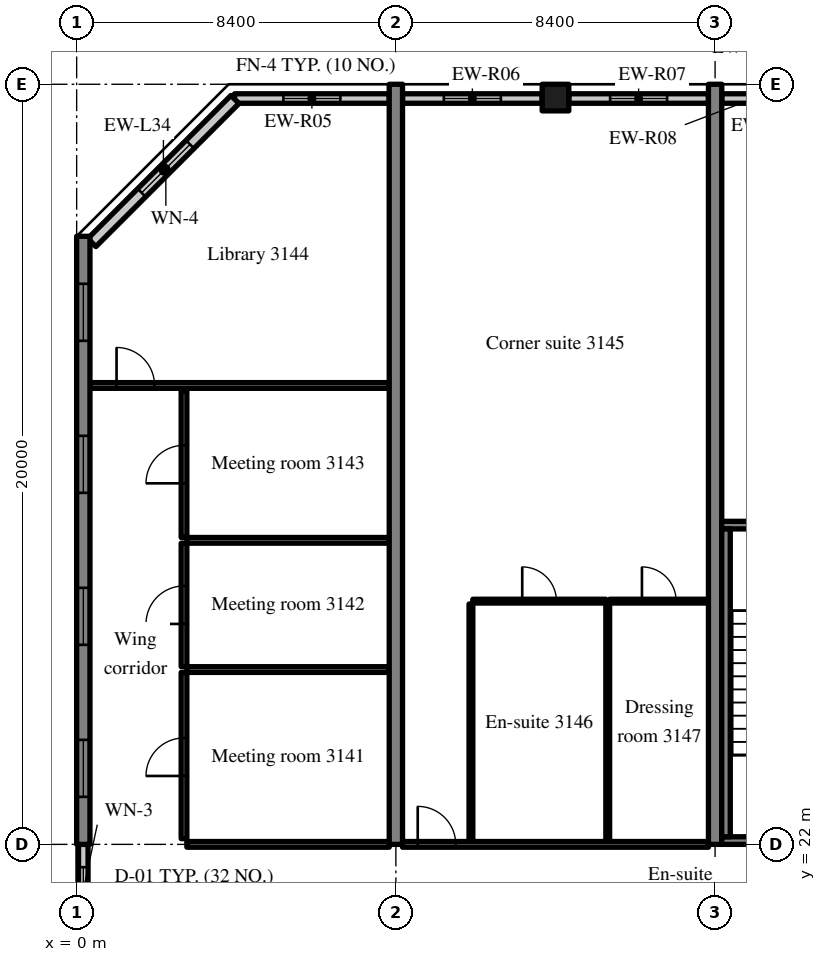
"""IFC4 building model, lengths in metres.
Left out: names, types, materials, properties, quantities, classifications, styles, units other than length and angle.
Written with IfcOpenShell. Run it as: python <this file> out.ifc"""

import sys

from ifc_helpers import new_model, si_unit, direction, frame, frame_2d, origin, origin_2d, place, context, subcontext, project, spatial, rectangle, extrude, source, transform, mapped, element, fill, save


model = new_model("IFC4")
c1 = context("Model", 3, precision=1e-05, world=origin(), true_north=direction((0.0, 1.0)))
c2 = subcontext(c1, "Body", "Model", "MODEL_VIEW")
j1 = project(units=[si_unit("LENGTHUNIT", "METRE"), si_unit("PLANEANGLEUNIT", "RADIAN")], contexts=[c1])
p1 = place(None, origin())
s1 = spatial("IfcSite", under=j1, at=p1, CompositionType="ELEMENT")
p2 = place(p1, origin())
s2 = spatial("IfcBuilding", under=s1, at=p2, CompositionType="ELEMENT")
p3 = place(p2, frame((0.0, 0.0, 129.4)))
s3 = spatial("IfcBuildingStorey", under=s2, at=p3, CompositionType="ELEMENT", Elevation=129.4)
m1 = source(origin(), c2, "Body", "SweptSolid", [
    extrude(rectangle(XDim=16.0, YDim=0.35, at=frame_2d((8.0, 0.0))), origin(), (0.0, 0.0, 1.0), 3.52),
])
p4 = place(p3, frame((0.175, 22.0, 0.0), z_axis=(0.0, 0.0, 1.0), x_axis=(0.0, 1.0, 0.0)))
e1 = element("IfcWall", 1, at=p4, inside=s3, PredefinedType="SHEAR", context=c2, shape_type="MappedRepresentation", body=[
    mapped(m1, transform((0.0, 0.0, 0.0), scale=1.0)),
])
m2 = source(origin(), c2, "Body", "SweptSolid", [
    extrude(rectangle(XDim=1.5, YDim=1.5, at=frame_2d((0.75, 0.75))), frame((0.0, 0.185, 0.0), z_axis=(0.0, -1.0, 0.0), x_axis=(1.0, 0.0, 0.0)), (0.0, 0.0, 1.0), 0.37),
])
p5 = place(p4, frame((1.25, 0.0, 0.9)))
e2 = element("IfcOpeningElement", 2, at=p5, cuts=e1, PredefinedType="OPENING", context=c2, shape_type="MappedRepresentation", body=[
    mapped(m2, transform((0.0, 0.0, 0.0), scale=1.0)),
])
p6 = place(p4, frame((5.25, 0.0, 0.9)))
e3 = element("IfcOpeningElement", 3, at=p6, cuts=e1, PredefinedType="OPENING", context=c2, shape_type="MappedRepresentation", body=[
    mapped(m2, transform((0.0, 0.0, 0.0), scale=1.0)),
])
p7 = place(p4, frame((9.25, 0.0, 0.9)))
e4 = element("IfcOpeningElement", 4, at=p7, cuts=e1, PredefinedType="OPENING", context=c2, shape_type="MappedRepresentation", body=[
    mapped(m2, transform((0.0, 0.0, 0.0), scale=1.0)),
])
p8 = place(p4, frame((13.25, 0.0, 0.9)))
e5 = element("IfcOpeningElement", 5, at=p8, cuts=e1, PredefinedType="OPENING", context=c2, shape_type="MappedRepresentation", body=[
    mapped(m2, transform((0.0, 0.0, 0.0), scale=1.0)),
])
m3 = source(origin(), c2, "Body", "SweptSolid", [
    extrude(rectangle(XDim=20.0, YDim=0.35, at=frame_2d((10.0, 0.0))), origin(), (0.0, 0.0, 1.0), 3.52),
])
for number, where, z_axis, x_axis in (
    (6, (8.4, 22.0, 0.0), (0.0, 0.0, 1.0), (0.0, 1.0, 0.0)),
    (7, (16.8, 22.0, 0.0), (0.0, 0.0, 1.0), (0.0, 1.0, 0.0)),
):
    element("IfcWall", number, at=place(p3, frame(where, z_axis=z_axis, x_axis=x_axis)), inside=s3, PredefinedType="SHEAR", context=c2, shape_type="MappedRepresentation", body=[
        mapped(m3, transform((0.0, 0.0, 0.0), scale=1.0)),
    ])
m4 = source(origin(), c2, "Body", "SweptSolid", [
    extrude(rectangle(XDim=0.7, YDim=0.7, at=origin_2d()), origin(), (0.0, 0.0, 1.0), 3.52),
])
p9 = place(p3, frame((12.6, 41.65, 0.0), z_axis=(0.0, 0.0, 1.0), x_axis=(1.0, 0.0, 0.0)))
e8 = element("IfcColumn", 8, at=p9, inside=s3, PredefinedType="COLUMN", context=c2, shape_type="MappedRepresentation", body=[
    mapped(m4, transform((0.0, 0.0, 0.0), scale=1.0)),
])
m5 = source(origin(), c2, "Body", "SweptSolid", [
    extrude(rectangle(XDim=4.07, YDim=0.25, at=frame_2d((2.035, 0.0))), origin(), (0.0, 0.0, 1.0), 2.82),
])
p10 = place(p3, frame((8.225, 41.625, 0.0), z_axis=(0.0, 0.0, 1.0), x_axis=(-1.0, 0.0, 0.0)))
e9 = element("IfcWall", 9, at=p10, inside=s3, PredefinedType="SOLIDWALL", context=c2, shape_type="MappedRepresentation", body=[
    mapped(m5, transform((0.0, 0.0, 0.0), scale=1.0)),
])
m6 = source(origin(), c2, "Body", "SweptSolid", [
    extrude(rectangle(XDim=1.5, YDim=1.5, at=frame_2d((0.75, 0.75))), frame((0.0, 0.135, 0.0), z_axis=(0.0, -1.0, 0.0), x_axis=(1.0, 0.0, 0.0)), (0.0, 0.0, 1.0), 0.27),
])
p11 = place(p10, frame((1.285, 0.0, 0.9)))
e10 = element("IfcOpeningElement", 10, at=p11, cuts=e9, PredefinedType="OPENING", context=c2, shape_type="MappedRepresentation", body=[
    mapped(m6, transform((0.0, 0.0, 0.0), scale=1.0)),
])
m7 = source(origin(), c2, "Body", "SweptSolid", [
    extrude(rectangle(XDim=3.675, YDim=0.25, at=frame_2d((1.837, 0.0))), origin(), (0.0, 0.0, 1.0), 2.82),
])
p12 = place(p3, frame((12.25, 41.625, 0.0), z_axis=(0.0, 0.0, 1.0), x_axis=(-1.0, 0.0, 0.0)))
e11 = element("IfcWall", 11, at=p12, inside=s3, PredefinedType="SOLIDWALL", context=c2, shape_type="MappedRepresentation", body=[
    mapped(m7, transform((0.0, 0.0, 0.0), scale=1.0)),
])
p13 = place(p12, frame((1.087, 0.0, 0.9)))
e12 = element("IfcOpeningElement", 12, at=p13, cuts=e11, PredefinedType="OPENING", context=c2, shape_type="MappedRepresentation", body=[
    mapped(m6, transform((0.0, 0.0, 0.0), scale=1.0)),
])
p14 = place(p3, frame((16.625, 41.625, 0.0), z_axis=(0.0, 0.0, 1.0), x_axis=(-1.0, 0.0, 0.0)))
e13 = element("IfcWall", 13, at=p14, inside=s3, PredefinedType="SOLIDWALL", context=c2, shape_type="MappedRepresentation", body=[
    mapped(m7, transform((0.0, 0.0, 0.0), scale=1.0)),
])
p15 = place(p14, frame((1.087, 0.0, 0.9)))
e14 = element("IfcOpeningElement", 14, at=p15, cuts=e13, PredefinedType="OPENING", context=c2, shape_type="MappedRepresentation", body=[
    mapped(m6, transform((0.0, 0.0, 0.0), scale=1.0)),
])
m8 = source(origin(), c2, "Body", "SweptSolid", [
    extrude(rectangle(XDim=1.683, YDim=0.25, at=frame_2d((0.841, 0.0))), origin(), (0.0, 0.0, 1.0), 2.82),
])
p16 = place(p3, frame((18.658, 41.625, 0.0), z_axis=(0.0, 0.0, 1.0), x_axis=(-1.0, 0.0, 0.0)))
e15 = element("IfcWall", 15, at=p16, inside=s3, PredefinedType="SOLIDWALL", context=c2, shape_type="MappedRepresentation", body=[
    mapped(m8, transform((0.0, 0.0, 0.0), scale=1.0)),
])
m9 = source(origin(), c2, "Body", "SweptSolid", [
    extrude(rectangle(XDim=5.326, YDim=0.3, at=frame_2d((2.663, 0.0))), origin(), (0.0, 0.0, 1.0), 3.52),
])
p17 = place(p3, frame((4.166, 41.6, 0.0), z_axis=(0.0, 0.0, 1.0), x_axis=(-0.707106781187, -0.707106781187, 0.0)))
e16 = element("IfcWall", 16, at=p17, inside=s3, PredefinedType="SOLIDWALL", context=c2, shape_type="MappedRepresentation", body=[
    mapped(m9, transform((0.0, 0.0, 0.0), scale=1.0)),
])
m10 = source(origin(), c2, "Body", "SweptSolid", [
    extrude(rectangle(XDim=1.8, YDim=1.5, at=frame_2d((0.9, 0.75))), frame((0.0, 0.16, 0.0), z_axis=(0.0, -1.0, 0.0), x_axis=(1.0, 0.0, 0.0)), (0.0, 0.0, 1.0), 0.32),
])
p18 = place(p17, frame((1.672, 0.0, 0.9)))
e17 = element("IfcOpeningElement", 17, at=p18, cuts=e16, PredefinedType="OPENING", context=c2, shape_type="MappedRepresentation", body=[
    mapped(m10, transform((0.0, 0.0, 0.0), scale=1.0)),
])
m11 = source(origin(), c2, "Body", "SweptSolid", [
    extrude(rectangle(XDim=2.4, YDim=0.25, at=frame_2d((1.2, 0.0))), origin(), (0.0, 0.0, 1.0), 2.62),
])
p19 = place(p3, frame((0.175, 19.6, 0.0), z_axis=(0.0, 0.0, 1.0), x_axis=(0.0, 1.0, 0.0)))
e18 = element("IfcWall", 18, at=p19, inside=s3, PredefinedType="SOLIDWALL", context=c2, shape_type="MappedRepresentation", body=[
    mapped(m11, transform((0.0, 0.0, 0.0), scale=1.0)),
])
m12 = source(origin(), c2, "Body", "SweptSolid", [
    extrude(rectangle(XDim=1.2, YDim=1.5, at=frame_2d((0.6, 0.75))), frame((0.0, 0.135, 0.0), z_axis=(0.0, -1.0, 0.0), x_axis=(1.0, 0.0, 0.0)), (0.0, 0.0, 1.0), 0.27),
])
p20 = place(p19, frame((0.6, 0.0, 0.9)))
e19 = element("IfcOpeningElement", 19, at=p20, cuts=e18, PredefinedType="OPENING", context=c2, shape_type="MappedRepresentation", body=[
    mapped(m12, transform((0.0, 0.0, 0.0), scale=1.0)),
])
m13 = source(origin(), c2, "Body", "SweptSolid", [
    extrude(rectangle(XDim=8.225, YDim=0.2, at=frame_2d((4.112, 0.0))), origin(), (0.0, 0.0, 1.0), 3.52),
])
p21 = place(p3, frame((16.975, 22.1, 0.0), z_axis=(0.0, 0.0, 1.0), x_axis=(1.0, 0.0, 0.0)))
e20 = element("IfcWall", 20, at=p21, inside=s3, PredefinedType="SOLIDWALL", context=c2, shape_type="MappedRepresentation", body=[
    mapped(m13, transform((0.0, 0.0, 0.0), scale=1.0)),
])
m14 = source(origin(), c2, "Body", "SweptSolid", [
    extrude(rectangle(XDim=1.2, YDim=2.1, at=frame_2d((0.6, 1.05))), frame((0.0, 0.11, 0.0), z_axis=(0.0, -1.0, 0.0), x_axis=(1.0, 0.0, 0.0)), (0.0, 0.0, 1.0), 0.22),
])
p22 = place(p21, frame((6.025, 0.0, 0.0)))
e21 = element("IfcOpeningElement", 21, at=p22, cuts=e20, PredefinedType="OPENING", context=c2, shape_type="MappedRepresentation", body=[
    mapped(m14, transform((0.0, 0.0, 0.0), scale=1.0)),
])
p23 = place(p3, frame((16.975, 30.4, 0.0), z_axis=(0.0, 0.0, 1.0), x_axis=(1.0, 0.0, 0.0)))
e22 = element("IfcWall", 22, at=p23, inside=s3, PredefinedType="SOLIDWALL", context=c2, shape_type="MappedRepresentation", body=[
    mapped(m13, transform((0.0, 0.0, 0.0), scale=1.0)),
])
m15 = source(origin(), c2, "Body", "SweptSolid", [
    extrude(rectangle(XDim=1.0, YDim=2.1, at=frame_2d((0.5, 1.05))), frame((0.0, 0.11, 0.0), z_axis=(0.0, -1.0, 0.0), x_axis=(1.0, 0.0, 0.0)), (0.0, 0.0, 1.0), 0.22),
])
p24 = place(p23, frame((6.125, 0.0, 0.0)))
e23 = element("IfcOpeningElement", 23, at=p24, cuts=e22, PredefinedType="OPENING", context=c2, shape_type="MappedRepresentation", body=[
    mapped(m15, transform((0.0, 0.0, 0.0), scale=1.0)),
])
m16 = source(origin(), c2, "Body", "SweptSolid", [
    extrude(rectangle(XDim=8.1, YDim=0.225, at=frame_2d((4.05, 0.0))), origin(), (0.0, 0.0, 1.0), 3.52),
])
p25 = place(p3, frame((17.087, 22.2, 0.0), z_axis=(0.0, 0.0, 1.0), x_axis=(0.0, 1.0, 0.0)))
e24 = element("IfcWall", 24, at=p25, inside=s3, PredefinedType="SOLIDWALL", context=c2, shape_type="MappedRepresentation", body=[
    mapped(m16, transform((0.0, 0.0, 0.0), scale=1.0)),
])
m17 = source(origin(), c2, "Body", "SweptSolid", [
    extrude(rectangle(XDim=5.325, YDim=0.15, at=frame_2d((2.663, 0.0))), origin(), (0.0, 0.0, 1.0), 2.82),
])
p26 = place(p3, frame((2.9, 22.0, 0.0), z_axis=(0.0, 0.0, 1.0), x_axis=(1.0, 0.0, 0.0)))
e25 = element("IfcWall", 25, at=p26, inside=s3, PredefinedType="PARTITIONING", context=c2, shape_type="MappedRepresentation", body=[
    mapped(m17, transform((0.0, 0.0, 0.0), scale=1.0)),
])
m18 = source(origin(), c2, "Body", "SweptSolid", [
    extrude(rectangle(XDim=4.375, YDim=0.15, at=frame_2d((2.188, 0.0))), origin(), (0.0, 0.0, 1.0), 3.52),
])
p27 = place(p3, frame((2.825, 22.15, 0.0), z_axis=(0.0, 0.0, 1.0), x_axis=(0.0, 1.0, 0.0)))
e26 = element("IfcWall", 26, at=p27, inside=s3, PredefinedType="PARTITIONING", context=c2, shape_type="MappedRepresentation", body=[
    mapped(m18, transform((0.0, 0.0, 0.0), scale=1.0)),
])
m19 = source(origin(), c2, "Body", "SweptSolid", [
    extrude(rectangle(XDim=1.0, YDim=2.1, at=frame_2d((0.5, 1.05))), frame((0.0, 0.085, 0.0), z_axis=(0.0, -1.0, 0.0), x_axis=(1.0, 0.0, 0.0)), (0.0, 0.0, 1.0), 0.17),
])
p28 = place(p27, frame((1.65, 0.0, 0.0)))
e27 = element("IfcOpeningElement", 27, at=p28, cuts=e26, PredefinedType="OPENING", context=c2, shape_type="MappedRepresentation", body=[
    mapped(m19, transform((0.0, 0.0, 0.0), scale=1.0)),
])
m20 = source(origin(), c2, "Body", "SweptSolid", [
    extrude(rectangle(XDim=5.325, YDim=0.15, at=frame_2d((2.663, 0.0))), origin(), (0.0, 0.0, 1.0), 3.52),
])
p29 = place(p3, frame((2.9, 26.6, 0.0), z_axis=(0.0, 0.0, 1.0), x_axis=(1.0, 0.0, 0.0)))
e28 = element("IfcWall", 28, at=p29, inside=s3, PredefinedType="PARTITIONING", context=c2, shape_type="MappedRepresentation", body=[
    mapped(m20, transform((0.0, 0.0, 0.0), scale=1.0)),
])
m21 = source(origin(), c2, "Body", "SweptSolid", [
    extrude(rectangle(XDim=3.25, YDim=0.15, at=frame_2d((1.625, 0.0))), origin(), (0.0, 0.0, 1.0), 3.52),
])
p30 = place(p3, frame((2.825, 26.675, 0.0), z_axis=(0.0, 0.0, 1.0), x_axis=(0.0, 1.0, 0.0)))
e29 = element("IfcWall", 29, at=p30, inside=s3, PredefinedType="PARTITIONING", context=c2, shape_type="MappedRepresentation", body=[
    mapped(m21, transform((0.0, 0.0, 0.0), scale=1.0)),
])
p31 = place(p30, frame((1.125, 0.0, 0.0)))
e30 = element("IfcOpeningElement", 30, at=p31, cuts=e29, PredefinedType="OPENING", context=c2, shape_type="MappedRepresentation", body=[
    mapped(m19, transform((0.0, 0.0, 0.0), scale=1.0)),
])
p32 = place(p3, frame((2.9, 30.0, 0.0), z_axis=(0.0, 0.0, 1.0), x_axis=(1.0, 0.0, 0.0)))
e31 = element("IfcWall", 31, at=p32, inside=s3, PredefinedType="PARTITIONING", context=c2, shape_type="MappedRepresentation", body=[
    mapped(m20, transform((0.0, 0.0, 0.0), scale=1.0)),
])
m22 = source(origin(), c2, "Body", "SweptSolid", [
    extrude(rectangle(XDim=3.85, YDim=0.15, at=frame_2d((1.925, 0.0))), origin(), (0.0, 0.0, 1.0), 3.52),
])
p33 = place(p3, frame((2.825, 30.075, 0.0), z_axis=(0.0, 0.0, 1.0), x_axis=(0.0, 1.0, 0.0)))
e32 = element("IfcWall", 32, at=p33, inside=s3, PredefinedType="PARTITIONING", context=c2, shape_type="MappedRepresentation", body=[
    mapped(m22, transform((0.0, 0.0, 0.0), scale=1.0)),
])
p34 = place(p33, frame((1.425, 0.0, 0.0)))
e33 = element("IfcOpeningElement", 33, at=p34, cuts=e32, PredefinedType="OPENING", context=c2, shape_type="MappedRepresentation", body=[
    mapped(m19, transform((0.0, 0.0, 0.0), scale=1.0)),
])
m23 = source(origin(), c2, "Body", "SweptSolid", [
    extrude(rectangle(XDim=7.875, YDim=0.15, at=frame_2d((3.938, 0.0))), origin(), (0.0, 0.0, 1.0), 3.52),
])
p35 = place(p3, frame((0.35, 34.075, 0.0), z_axis=(0.0, 0.0, 1.0), x_axis=(1.0, 0.0, 0.0)))
e34 = element("IfcWall", 34, at=p35, inside=s3, PredefinedType="PARTITIONING", context=c2, shape_type="MappedRepresentation", body=[
    mapped(m23, transform((0.0, 0.0, 0.0), scale=1.0)),
])
p36 = place(p35, frame((0.7, 0.0, 0.0)))
e35 = element("IfcOpeningElement", 35, at=p36, cuts=e34, PredefinedType="OPENING", context=c2, shape_type="MappedRepresentation", body=[
    mapped(m19, transform((0.0, 0.0, 0.0), scale=1.0)),
])
m24 = source(origin(), c2, "Body", "SweptSolid", [
    extrude(rectangle(XDim=6.25, YDim=0.1, at=frame_2d((3.125, 0.0))), origin(), (0.0, 0.0, 1.0), 3.52),
])
for number, where, z_axis, x_axis in (
    (36, (10.375, 22.075, 0.0), (0.0, 0.0, 1.0), (0.0, 1.0, 0.0)),
    (37, (13.975, 22.075, 0.0), (0.0, 0.0, 1.0), (0.0, 1.0, 0.0)),
):
    element("IfcWall", number, at=place(p3, frame(where, z_axis=z_axis, x_axis=x_axis)), inside=s3, PredefinedType="PARTITIONING", context=c2, shape_type="MappedRepresentation", body=[
        mapped(m24, transform((0.0, 0.0, 0.0), scale=1.0)),
    ])
m25 = source(origin(), c2, "Body", "SweptSolid", [
    extrude(rectangle(XDim=3.5, YDim=0.1, at=frame_2d((1.75, 0.0))), origin(), (0.0, 0.0, 1.0), 3.52),
])
p37 = place(p3, frame((10.425, 28.4, 0.0), z_axis=(0.0, 0.0, 1.0), x_axis=(1.0, 0.0, 0.0)))
e38 = element("IfcWall", 38, at=p37, inside=s3, PredefinedType="PARTITIONING", context=c2, shape_type="MappedRepresentation", body=[
    mapped(m25, transform((0.0, 0.0, 0.0), scale=1.0)),
])
m26 = source(origin(), c2, "Body", "SweptSolid", [
    extrude(rectangle(XDim=0.9, YDim=2.1, at=frame_2d((0.45, 1.05))), frame((0.0, 0.06, 0.0), z_axis=(0.0, -1.0, 0.0), x_axis=(1.0, 0.0, 0.0)), (0.0, 0.0, 1.0), 0.12),
])
p38 = place(p37, frame((1.3, 0.0, 0.0)))
e39 = element("IfcOpeningElement", 39, at=p38, cuts=e38, PredefinedType="OPENING", context=c2, shape_type="MappedRepresentation", body=[
    mapped(m26, transform((0.0, 0.0, 0.0), scale=1.0)),
])
m27 = source(origin(), c2, "Body", "SweptSolid", [
    extrude(rectangle(XDim=2.6, YDim=0.1, at=frame_2d((1.3, 0.0))), origin(), (0.0, 0.0, 1.0), 3.52),
])
p39 = place(p3, frame((14.025, 28.4, 0.0), z_axis=(0.0, 0.0, 1.0), x_axis=(1.0, 0.0, 0.0)))
e40 = element("IfcWall", 40, at=p39, inside=s3, PredefinedType="PARTITIONING", context=c2, shape_type="MappedRepresentation", body=[
    mapped(m27, transform((0.0, 0.0, 0.0), scale=1.0)),
])
p40 = place(p39, frame((0.85, 0.0, 0.0)))
e41 = element("IfcOpeningElement", 41, at=p40, cuts=e40, PredefinedType="OPENING", context=c2, shape_type="MappedRepresentation", body=[
    mapped(m26, transform((0.0, 0.0, 0.0), scale=1.0)),
])
m28 = source(origin(), c2, "Body", "SweptSolid", [
    extrude(rectangle(XDim=8.05, YDim=0.15, at=frame_2d((4.025, 0.0))), origin(), (0.0, 0.0, 1.0), 2.82),
])
p41 = place(p3, frame((8.575, 22.0, 0.0), z_axis=(0.0, 0.0, 1.0), x_axis=(1.0, 0.0, 0.0)))
e42 = element("IfcWall", 42, at=p41, inside=s3, PredefinedType="PARTITIONING", context=c2, shape_type="MappedRepresentation", body=[
    mapped(m28, transform((0.0, 0.0, 0.0), scale=1.0)),
])
p42 = place(p41, frame((0.4, 0.0, 0.0)))
e43 = element("IfcOpeningElement", 43, at=p42, cuts=e42, PredefinedType="OPENING", context=c2, shape_type="MappedRepresentation", body=[
    mapped(m19, transform((0.0, 0.0, 0.0), scale=1.0)),
])
m29 = source(origin(), c2, "Body", "SweptSolid", [
    extrude(rectangle(XDim=1.5, YDim=1.5, at=frame_2d((0.75, 0.75))), frame((0.0, 0.03, 0.0), z_axis=(0.0, -1.0, 0.0), x_axis=(1.0, 0.0, 0.0)), (0.0, 0.0, 1.0), 0.06),
])
p43 = place(p11, origin())
e44 = element("IfcWindow", 44, at=p43, inside=s3, PartitioningType="SINGLE_PANEL", PredefinedType="WINDOW", context=c2, shape_type="MappedRepresentation", body=[
    mapped(m29, transform((0.0, 0.0, 0.0), scale=1.0)),
])
fill(e10, e44)
p44 = place(p13, origin())
e45 = element("IfcWindow", 45, at=p44, inside=s3, PartitioningType="SINGLE_PANEL", PredefinedType="WINDOW", context=c2, shape_type="MappedRepresentation", body=[
    mapped(m29, transform((0.0, 0.0, 0.0), scale=1.0)),
])
fill(e12, e45)
p45 = place(p15, origin())
e46 = element("IfcWindow", 46, at=p45, inside=s3, PartitioningType="SINGLE_PANEL", PredefinedType="WINDOW", context=c2, shape_type="MappedRepresentation", body=[
    mapped(m29, transform((0.0, 0.0, 0.0), scale=1.0)),
])
fill(e14, e46)
m30 = source(origin(), c2, "Body", "SweptSolid", [
    extrude(rectangle(XDim=1.8, YDim=1.5, at=frame_2d((0.9, 0.75))), frame((0.0, 0.03, 0.0), z_axis=(0.0, -1.0, 0.0), x_axis=(1.0, 0.0, 0.0)), (0.0, 0.0, 1.0), 0.06),
])
p46 = place(p18, origin())
e47 = element("IfcWindow", 47, at=p46, inside=s3, PartitioningType="SINGLE_PANEL", PredefinedType="WINDOW", context=c2, shape_type="MappedRepresentation", body=[
    mapped(m30, transform((0.0, 0.0, 0.0), scale=1.0)),
])
fill(e17, e47)
p47 = place(p5, origin())
e48 = element("IfcWindow", 48, at=p47, inside=s3, PartitioningType="SINGLE_PANEL", PredefinedType="WINDOW", context=c2, shape_type="MappedRepresentation", body=[
    mapped(m29, transform((0.0, 0.0, 0.0), scale=1.0)),
])
fill(e2, e48)
p48 = place(p6, origin())
e49 = element("IfcWindow", 49, at=p48, inside=s3, PartitioningType="SINGLE_PANEL", PredefinedType="WINDOW", context=c2, shape_type="MappedRepresentation", body=[
    mapped(m29, transform((0.0, 0.0, 0.0), scale=1.0)),
])
fill(e3, e49)
p49 = place(p7, origin())
e50 = element("IfcWindow", 50, at=p49, inside=s3, PartitioningType="SINGLE_PANEL", PredefinedType="WINDOW", context=c2, shape_type="MappedRepresentation", body=[
    mapped(m29, transform((0.0, 0.0, 0.0), scale=1.0)),
])
fill(e4, e50)
p50 = place(p8, origin())
e51 = element("IfcWindow", 51, at=p50, inside=s3, PartitioningType="SINGLE_PANEL", PredefinedType="WINDOW", context=c2, shape_type="MappedRepresentation", body=[
    mapped(m29, transform((0.0, 0.0, 0.0), scale=1.0)),
])
fill(e5, e51)
m31 = source(origin(), c2, "Body", "SweptSolid", [
    extrude(rectangle(XDim=1.2, YDim=1.5, at=frame_2d((0.6, 0.75))), frame((0.0, 0.03, 0.0), z_axis=(0.0, -1.0, 0.0), x_axis=(1.0, 0.0, 0.0)), (0.0, 0.0, 1.0), 0.06),
])
p51 = place(p20, origin())
e52 = element("IfcWindow", 52, at=p51, inside=s3, PartitioningType="SINGLE_PANEL", PredefinedType="WINDOW", context=c2, shape_type="MappedRepresentation", body=[
    mapped(m31, transform((0.0, 0.0, 0.0), scale=1.0)),
])
fill(e19, e52)
m32 = source(origin(), c2, "Body", "SweptSolid", [
    extrude(rectangle(XDim=1.0, YDim=2.1, at=frame_2d((0.5, 1.05))), frame((0.0, 0.025, 0.0), z_axis=(0.0, -1.0, 0.0), x_axis=(1.0, 0.0, 0.0)), (0.0, 0.0, 1.0), 0.05),
])
p52 = place(p28, origin())
e53 = element("IfcDoor", 53, at=p52, inside=s3, OperationType="SINGLE_SWING_LEFT", PredefinedType="DOOR", context=c2, shape_type="MappedRepresentation", body=[
    mapped(m32, transform((0.0, 0.0, 0.0), scale=1.0)),
])
fill(e27, e53)
p53 = place(p31, origin())
e54 = element("IfcDoor", 54, at=p53, inside=s3, OperationType="SINGLE_SWING_LEFT", PredefinedType="DOOR", context=c2, shape_type="MappedRepresentation", body=[
    mapped(m32, transform((0.0, 0.0, 0.0), scale=1.0)),
])
fill(e30, e54)
p54 = place(p34, origin())
e55 = element("IfcDoor", 55, at=p54, inside=s3, OperationType="SINGLE_SWING_LEFT", PredefinedType="DOOR", context=c2, shape_type="MappedRepresentation", body=[
    mapped(m32, transform((0.0, 0.0, 0.0), scale=1.0)),
])
fill(e33, e55)
p55 = place(p36, origin())
e56 = element("IfcDoor", 56, at=p55, inside=s3, OperationType="SINGLE_SWING_LEFT", PredefinedType="DOOR", context=c2, shape_type="MappedRepresentation", body=[
    mapped(m32, transform((0.0, 0.0, 0.0), scale=1.0)),
])
fill(e35, e56)
m33 = source(origin(), c2, "Body", "SweptSolid", [
    extrude(rectangle(XDim=0.9, YDim=2.1, at=frame_2d((0.45, 1.05))), frame((0.0, 0.025, 0.0), z_axis=(0.0, -1.0, 0.0), x_axis=(1.0, 0.0, 0.0)), (0.0, 0.0, 1.0), 0.05),
])
p56 = place(p38, origin())
e57 = element("IfcDoor", 57, at=p56, inside=s3, OperationType="SINGLE_SWING_LEFT", PredefinedType="DOOR", context=c2, shape_type="MappedRepresentation", body=[
    mapped(m33, transform((0.0, 0.0, 0.0), scale=1.0)),
])
fill(e39, e57)
p57 = place(p40, origin())
e58 = element("IfcDoor", 58, at=p57, inside=s3, OperationType="SINGLE_SWING_LEFT", PredefinedType="DOOR", context=c2, shape_type="MappedRepresentation", body=[
    mapped(m33, transform((0.0, 0.0, 0.0), scale=1.0)),
])
fill(e41, e58)
p58 = place(p42, origin())
e59 = element("IfcDoor", 59, at=p58, inside=s3, OperationType="SINGLE_SWING_LEFT", PredefinedType="DOOR", context=c2, shape_type="MappedRepresentation", body=[
    mapped(m32, transform((0.0, 0.0, 0.0), scale=1.0)),
])
fill(e43, e59)
save(model, sys.argv[1])
